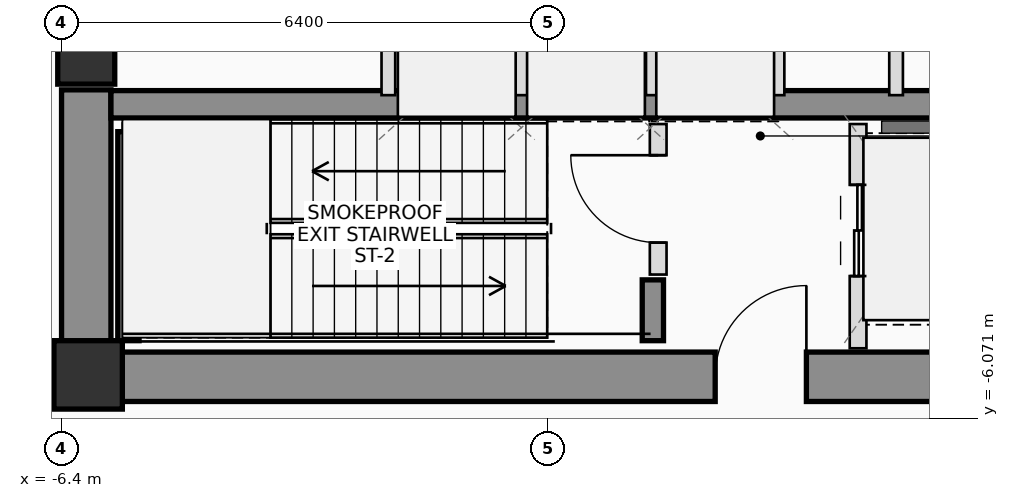
"""IFC4 building model, lengths in metres.
Left out: names, types, materials, properties, quantities, classifications, styles, units other than length and angle.
Written with IfcOpenShell. Run it as: python <this file> out.ifc"""

import sys

from ifc_helpers import new_model, si_unit, direction, frame, frame_2d, origin, origin_2d, place, context, subcontext, project, spatial, rectangle, extrude, source, transform, mapped, element, fill, save


model = new_model("IFC4")
c1 = context("Model", 3, precision=1e-05, world=origin(), true_north=direction((0.0, 1.0)))
c2 = subcontext(c1, "Body", "Model", "MODEL_VIEW")
j1 = project(units=[si_unit("LENGTHUNIT", "METRE"), si_unit("PLANEANGLEUNIT", "RADIAN")], contexts=[c1])
p1 = place(None, origin())
s1 = spatial("IfcSite", under=j1, at=p1, CompositionType="ELEMENT")
p2 = place(p1, origin())
s2 = spatial("IfcBuilding", under=s1, at=p2, CompositionType="ELEMENT")
p3 = place(p2, frame((0.0, 0.0, 125.0)))
s3 = spatial("IfcBuildingStorey", under=s2, at=p3, CompositionType="ELEMENT", Elevation=125.0)
m1 = source(origin(), c2, "Body", "SweptSolid", [
    extrude(rectangle(XDim=0.9, YDim=0.9, at=origin_2d()), origin(), (0.0, 0.0, 1.0), 4.5),
])
p4 = place(p3, frame((-6.05, -5.5, 0.0), z_axis=(0.0, 0.0, 1.0), x_axis=(1.0, 0.0, 0.0)))
e1 = element("IfcColumn", 1, at=p4, inside=s3, PredefinedType="COLUMN", context=c2, shape_type="MappedRepresentation", body=[
    mapped(m1, transform((0.0, 0.0, 0.0), scale=1.0)),
])
p5 = place(p3, frame((-6.4, -5.525, 0.0), z_axis=(0.0, 0.0, 1.0), x_axis=(1.0, 0.0, 0.0)))
e2 = element("IfcWall", 2, at=p5, inside=s3, PredefinedType="SHEAR", context=c2, shape_type="SweptSolid", body=[
    extrude(rectangle(XDim=12.8, YDim=0.65, at=frame_2d((6.4, 0.0))), origin(), (0.0, 0.0, 1.0), 4.5),
])
p6 = place(p5, frame((8.6, 0.0, 0.0)))
e3 = element("IfcOpeningElement", 3, at=p6, cuts=e2, PredefinedType="OPENING", context=c2, shape_type="SweptSolid", body=[
    extrude(rectangle(XDim=1.2, YDim=2.2, at=frame_2d((0.6, 1.1))), frame((0.0, 0.335, 0.0), z_axis=(0.0, -1.0, 0.0), x_axis=(1.0, 0.0, 0.0)), (0.0, 0.0, 1.0), 0.67),
])
p7 = place(p3, frame((-6.075, -5.2, 0.0), z_axis=(0.0, 0.0, 1.0), x_axis=(0.0, 1.0, 0.0)))
e4 = element("IfcWall", 4, at=p7, inside=s3, PredefinedType="SHEAR", context=c2, shape_type="SweptSolid", body=[
    extrude(rectangle(XDim=3.45, YDim=0.65, at=frame_2d((1.725, 0.0))), origin(), (0.0, 0.0, 1.0), 4.5),
])
p8 = place(p3, frame((-5.75, -1.94, 0.0), z_axis=(0.0, 0.0, 1.0), x_axis=(1.0, 0.0, 0.0)))
e5 = element("IfcWall", 5, at=p8, inside=s3, PredefinedType="SHEAR", context=c2, shape_type="SweptSolid", body=[
    extrude(rectangle(XDim=11.5, YDim=0.36, at=frame_2d((5.75, 0.0))), origin(), (0.0, 0.0, 1.0), 4.5),
])
p9 = place(p3, frame((-5.52, -5.05, 0.0), z_axis=(0.0, 0.0, 1.0), x_axis=(0.0, 1.0, 0.0)))
e6 = element("IfcWall", 6, at=p9, inside=s3, PredefinedType="SHEAR", context=c2, shape_type="SweptSolid", body=[
    extrude(rectangle(XDim=2.75, YDim=0.28, at=frame_2d((1.375, 0.0))), origin(), (0.0, 0.0, 1.0), 4.5),
])
p10 = place(p3, frame((1.38, -5.05, 0.0), z_axis=(0.0, 0.0, 1.0), x_axis=(0.0, 1.0, 0.0)))
e7 = element("IfcWall", 7, at=p10, inside=s3, PredefinedType="SHEAR", context=c2, shape_type="SweptSolid", body=[
    extrude(rectangle(XDim=0.8, YDim=0.28, at=frame_2d((0.4, 0.0))), origin(), (0.0, 0.0, 1.0), 4.5),
])
m2 = source(origin(), c2, "Body", "SweptSolid", [
    extrude(rectangle(XDim=0.75, YDim=0.75, at=origin_2d()), origin(), (0.0, 0.0, 1.0), 4.5),
])
p11 = place(p3, frame((-6.075, -1.3, 0.0), z_axis=(0.0, 0.0, 1.0), x_axis=(1.0, 0.0, 0.0)))
e8 = element("IfcColumn", 8, at=p11, inside=s3, PredefinedType="COLUMN", context=c2, shape_type="MappedRepresentation", body=[
    mapped(m2, transform((0.0, 0.0, 0.0), scale=1.0)),
])
p12 = place(p3, frame((1.45, -4.18, 0.0), z_axis=(0.0, 0.0, 1.0), x_axis=(0.0, 1.0, 0.0)))
e9 = element("IfcWall", 9, at=p12, inside=s3, PredefinedType="PLUMBINGWALL", context=c2, shape_type="SweptSolid", body=[
    extrude(rectangle(XDim=1.98, YDim=0.22, at=frame_2d((0.99, 0.0))), origin(), (0.0, 0.0, 1.0), 4.3),
])
p13 = place(p12, frame((0.42, 0.0, 0.0)))
e10 = element("IfcOpeningElement", 10, at=p13, cuts=e9, PredefinedType="OPENING", context=c2, shape_type="SweptSolid", body=[
    extrude(rectangle(XDim=1.15, YDim=2.15, at=frame_2d((0.575, 1.075))), frame((0.0, 0.12, 0.0), z_axis=(0.0, -1.0, 0.0), x_axis=(1.0, 0.0, 0.0)), (0.0, 0.0, 1.0), 0.24),
])
p14 = place(p3, frame((4.08, -5.15, 0.0), z_axis=(0.0, 0.0, 1.0), x_axis=(0.0, 1.0, 0.0)))
e11 = element("IfcWall", 11, at=p14, inside=s3, PredefinedType="PLUMBINGWALL", context=c2, shape_type="SweptSolid", body=[
    extrude(rectangle(XDim=2.95, YDim=0.22, at=frame_2d((1.475, 0.0))), origin(), (0.0, 0.0, 1.0), 4.3),
])
p15 = place(p14, frame((0.95, 0.0, 0.0)))
e12 = element("IfcOpeningElement", 12, at=p15, cuts=e11, PredefinedType="OPENING", context=c2, shape_type="SweptSolid", body=[
    extrude(rectangle(XDim=1.2, YDim=2.25, at=frame_2d((0.6, 1.125))), frame((0.0, 0.12, 0.0), z_axis=(0.0, -1.0, 0.0), x_axis=(1.0, 0.0, 0.0)), (0.0, 0.0, 1.0), 0.24),
])
for number, where, z_axis, x_axis in (
    (13, (-2.1, -1.82, 0.0), (0.0, 0.0, 1.0), (0.0, 1.0, 0.0)),
    (14, (-0.35, -1.82, 0.0), (0.0, 0.0, 1.0), (0.0, 1.0, 0.0)),
    (15, (1.38, -1.82, 0.0), (0.0, 0.0, 1.0), (0.0, 1.0, 0.0)),
    (16, (3.02, -1.82, 0.0), (0.0, 0.0, 1.0), (0.0, 1.0, 0.0)),
):
    element("IfcWall", number, at=place(p3, frame(where, z_axis=z_axis, x_axis=x_axis)), inside=s3, PredefinedType="PLUMBINGWALL", context=c2, shape_type="SweptSolid", body=[
        extrude(rectangle(XDim=0.98, YDim=0.18, at=frame_2d((0.49, 0.0))), origin(), (0.0, 0.0, 1.0), 4.3),
    ])
p16 = place(p3, frame((4.58, -1.82, 0.0), z_axis=(0.0, 0.0, 1.0), x_axis=(0.0, 1.0, 0.0)))
e17 = element("IfcWall", 17, at=p16, inside=s3, PredefinedType="PLUMBINGWALL", context=c2, shape_type="SweptSolid", body=[
    extrude(rectangle(XDim=3.64, YDim=0.18, at=frame_2d((1.82, 0.0))), origin(), (0.0, 0.0, 1.0), 4.3),
])
p17 = place(p16, frame((1.35, 0.0, 0.0)))
e18 = element("IfcOpeningElement", 18, at=p17, cuts=e17, PredefinedType="OPENING", context=c2, shape_type="SweptSolid", body=[
    extrude(rectangle(XDim=0.9, YDim=2.05, at=frame_2d((0.45, 1.025))), frame((0.0, 0.1, 0.0), z_axis=(0.0, -1.0, 0.0), x_axis=(1.0, 0.0, 0.0)), (0.0, 0.0, 1.0), 0.2),
])
p18 = place(p6, origin())
e19 = element("IfcDoor", 19, at=p18, inside=s3, OperationType="SINGLE_SWING_RIGHT", PredefinedType="DOOR", context=c2, shape_type="SweptSolid", body=[
    extrude(rectangle(XDim=1.2, YDim=2.2, at=frame_2d((0.6, 1.1))), frame((0.0, 0.025, 0.0), z_axis=(0.0, -1.0, 0.0), x_axis=(1.0, 0.0, 0.0)), (0.0, 0.0, 1.0), 0.05),
])
fill(e3, e19)
p19 = place(p13, origin())
e20 = element("IfcDoor", 20, at=p19, inside=s3, OperationType="SINGLE_SWING_RIGHT", PredefinedType="DOOR", context=c2, shape_type="SweptSolid", body=[
    extrude(rectangle(XDim=1.15, YDim=2.15, at=frame_2d((0.575, 1.075))), frame((0.0, 0.025, 0.0), z_axis=(0.0, -1.0, 0.0), x_axis=(1.0, 0.0, 0.0)), (0.0, 0.0, 1.0), 0.05),
])
fill(e10, e20)
p20 = place(p15, origin())
e21 = element("IfcDoor", 21, at=p20, inside=s3, OperationType="DOUBLE_DOOR_SLIDING", PredefinedType="DOOR", context=c2, shape_type="SweptSolid", body=[
    extrude(rectangle(XDim=1.2, YDim=2.25, at=frame_2d((0.6, 1.125))), frame((0.0, 0.025, 0.0), z_axis=(0.0, -1.0, 0.0), x_axis=(1.0, 0.0, 0.0)), (0.0, 0.0, 1.0), 0.05),
])
fill(e12, e21)
save(model, sys.argv[1])
